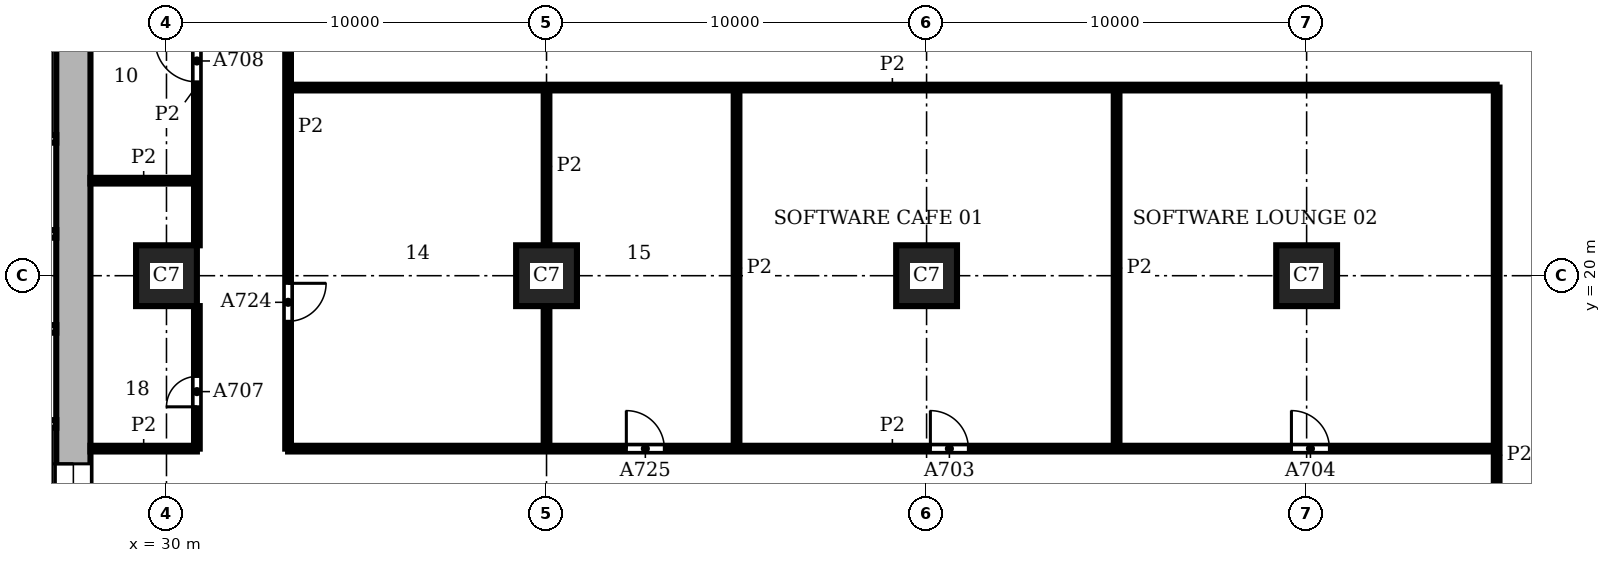
"""IFC4 building model, lengths in metres.
Left out: names, types, materials, properties, quantities, classifications, styles, units other than length and angle.
Written with IfcOpenShell. Run it as: python <this file> out.ifc"""

import sys

from ifc_helpers import new_model, si_unit, direction, frame, frame_2d, origin, origin_2d, place, context, subcontext, project, spatial, rectangle, extrude, element, fill, save


model = new_model("IFC4")
c1 = context("Model", 3, precision=1e-05, world=origin(), true_north=direction((0.0, 1.0)))
c2 = subcontext(c1, "Body", "Model", "MODEL_VIEW")
j1 = project(units=[si_unit("LENGTHUNIT", "METRE"), si_unit("PLANEANGLEUNIT", "RADIAN")], contexts=[c1])
p1 = place(None, origin())
s1 = spatial("IfcSite", under=j1, at=p1, CompositionType="ELEMENT")
p2 = place(p1, origin())
s2 = spatial("IfcBuilding", under=s1, at=p2, CompositionType="ELEMENT")
p3 = place(p2, frame((0.0, 0.0, 86.1)))
s3 = spatial("IfcBuildingStorey", under=s2, at=p3, CompositionType="ELEMENT", Elevation=86.1)
for number, where, z_axis, x_axis in (
    (1, (30.0, 20.0, 0.0), (0.0, 0.0, 1.0), (1.0, 0.0, 0.0)),
    (2, (40.0, 20.0, 0.0), (0.0, 0.0, 1.0), (1.0, 0.0, 0.0)),
    (3, (50.0, 20.0, 0.0), (0.0, 0.0, 1.0), (1.0, 0.0, 0.0)),
    (4, (60.0, 20.0, 0.0), (0.0, 0.0, 1.0), (1.0, 0.0, 0.0)),
):
    element("IfcColumn", number, at=place(p3, frame(where, z_axis=z_axis, x_axis=x_axis)), inside=s3, PredefinedType="COLUMN", context=c2, shape_type="SweptSolid", body=[
        extrude(rectangle(XDim=1.6, YDim=1.6, at=origin_2d()), origin(), (0.0, 0.0, 1.0), 3.9),
    ])
p4 = place(p3, frame((27.55, 8.9, 0.0), z_axis=(0.0, 0.0, 1.0), x_axis=(0.0, 1.0, 0.0)))
e5 = element("IfcWall", 5, at=p4, inside=s3, PredefinedType="SHEAR", context=c2, shape_type="SweptSolid", body=[
    extrude(rectangle(XDim=18.2, YDim=0.9, at=frame_2d((9.1, 0.0))), origin(), (0.0, 0.0, 1.0), 3.9),
])
p5 = place(p4, frame((4.55, 0.0, 0.0)))
e6 = element("IfcOpeningElement", 6, at=p5, cuts=e5, PredefinedType="OPENING", context=c2, shape_type="SweptSolid", body=[
    extrude(rectangle(XDim=1.6, YDim=2.1, at=frame_2d((0.8, 1.05))), frame((0.0, 0.46, 0.0), z_axis=(0.0, -1.0, 0.0), x_axis=(1.0, 0.0, 0.0)), (0.0, 0.0, 1.0), 0.92),
])
for number, where, z_axis, x_axis in (
    (7, (24.3, 16.1, 0.0), (0.0, 0.0, 1.0), (1.0, 0.0, 0.0)),
    (8, (24.3, 18.6, 0.0), (0.0, 0.0, 1.0), (1.0, 0.0, 0.0)),
    (9, (24.3, 21.1, 0.0), (0.0, 0.0, 1.0), (1.0, 0.0, 0.0)),
):
    element("IfcWall", number, at=place(p3, frame(where, z_axis=z_axis, x_axis=x_axis)), inside=s3, PredefinedType="SHEAR", context=c2, shape_type="SweptSolid", body=[
        extrude(rectangle(XDim=2.8, YDim=0.2, at=frame_2d((1.4, 0.0))), origin(), (0.0, 0.0, 1.0), 3.58),
    ])
p6 = place(p3, frame((13.8, 23.6, 0.0), z_axis=(0.0, 0.0, 1.0), x_axis=(1.0, 0.0, 0.0)))
e10 = element("IfcWall", 10, at=p6, inside=s3, PredefinedType="SHEAR", context=c2, shape_type="SweptSolid", body=[
    extrude(rectangle(XDim=13.3, YDim=0.2, at=frame_2d((6.65, 0.0))), origin(), (0.0, 0.0, 1.0), 3.58),
])
p7 = place(p6, frame((2.4, 0.0, 0.0)))
e11 = element("IfcOpeningElement", 11, at=p7, cuts=e10, PredefinedType="OPENING", context=c2, shape_type="SweptSolid", body=[
    extrude(rectangle(XDim=1.1, YDim=2.1, at=frame_2d((0.55, 1.05))), frame((0.0, 0.11, 0.0), z_axis=(0.0, -1.0, 0.0), x_axis=(1.0, 0.0, 0.0)), (0.0, 0.0, 1.0), 0.22),
])
p8 = place(p6, frame((4.9, 0.0, 0.0)))
e12 = element("IfcOpeningElement", 12, at=p8, cuts=e10, PredefinedType="OPENING", context=c2, shape_type="SweptSolid", body=[
    extrude(rectangle(XDim=1.1, YDim=2.1, at=frame_2d((0.55, 1.05))), frame((0.0, 0.11, 0.0), z_axis=(0.0, -1.0, 0.0), x_axis=(1.0, 0.0, 0.0)), (0.0, 0.0, 1.0), 0.22),
])
p9 = place(p6, frame((0.25, 0.0, 0.0)))
e13 = element("IfcOpeningElement", 13, at=p9, cuts=e10, PredefinedType="OPENING", context=c2, shape_type="SweptSolid", body=[
    extrude(rectangle(XDim=1.0, YDim=2.1, at=frame_2d((0.5, 1.05))), frame((0.0, 0.11, 0.0), z_axis=(0.0, -1.0, 0.0), x_axis=(1.0, 0.0, 0.0)), (0.0, 0.0, 1.0), 0.22),
])
p10 = place(p3, frame((30.8, 15.45, 0.0), z_axis=(0.0, 0.0, 1.0), x_axis=(0.0, 1.0, 0.0)))
e14 = element("IfcWall", 14, at=p10, inside=s3, PredefinedType="PARTITIONING", context=c2, shape_type="SweptSolid", body=[
    extrude(rectangle(XDim=3.75, YDim=0.15, at=frame_2d((1.875, 0.0))), origin(), (0.0, 0.0, 1.0), 3.58),
])
p11 = place(p10, frame((1.1, 0.0, 0.0)))
e15 = element("IfcOpeningElement", 15, at=p11, cuts=e14, PredefinedType="OPENING", context=c2, shape_type="SweptSolid", body=[
    extrude(rectangle(XDim=0.8, YDim=2.1, at=frame_2d((0.4, 1.05))), frame((0.0, 0.085, 0.0), z_axis=(0.0, -1.0, 0.0), x_axis=(1.0, 0.0, 0.0)), (0.0, 0.0, 1.0), 0.17),
])
p12 = place(p3, frame((30.8, 20.8, 0.0), z_axis=(0.0, 0.0, 1.0), x_axis=(0.0, 1.0, 0.0)))
e16 = element("IfcWall", 16, at=p12, inside=s3, PredefinedType="PARTITIONING", context=c2, shape_type="SweptSolid", body=[
    extrude(rectangle(XDim=8.4, YDim=0.15, at=frame_2d((4.2, 0.0))), origin(), (0.0, 0.0, 1.0), 3.58),
])
p13 = place(p12, frame((4.3, 0.0, 0.0)))
e17 = element("IfcOpeningElement", 17, at=p13, cuts=e16, PredefinedType="OPENING", context=c2, shape_type="SweptSolid", body=[
    extrude(rectangle(XDim=1.1, YDim=2.1, at=frame_2d((0.55, 1.05))), frame((0.0, 0.085, 0.0), z_axis=(0.0, -1.0, 0.0), x_axis=(1.0, 0.0, 0.0)), (0.0, 0.0, 1.0), 0.17),
])
p14 = place(p3, frame((33.2, 15.45, 0.0), z_axis=(0.0, 0.0, 1.0), x_axis=(0.0, 1.0, 0.0)))
e18 = element("IfcWall", 18, at=p14, inside=s3, PredefinedType="PARTITIONING", context=c2, shape_type="SweptSolid", body=[
    extrude(rectangle(XDim=16.912, YDim=0.15, at=frame_2d((8.456, 0.0))), origin(), (0.0, 0.0, 1.0), 3.58),
])
p15 = place(p14, frame((11.35, 0.0, 0.0)))
e19 = element("IfcOpeningElement", 19, at=p15, cuts=e18, PredefinedType="OPENING", context=c2, shape_type="SweptSolid", body=[
    extrude(rectangle(XDim=1.8, YDim=2.1, at=frame_2d((0.9, 1.05))), frame((0.0, 0.085, 0.0), z_axis=(0.0, -1.0, 0.0), x_axis=(1.0, 0.0, 0.0)), (0.0, 0.0, 1.0), 0.17),
])
p16 = place(p14, frame((3.35, 0.0, 0.0)))
e20 = element("IfcOpeningElement", 20, at=p16, cuts=e18, PredefinedType="OPENING", context=c2, shape_type="SweptSolid", body=[
    extrude(rectangle(XDim=1.0, YDim=2.1, at=frame_2d((0.5, 1.05))), frame((0.0, 0.085, 0.0), z_axis=(0.0, -1.0, 0.0), x_axis=(1.0, 0.0, 0.0)), (0.0, 0.0, 1.0), 0.17),
])
p17 = place(p3, frame((40.0, 15.45, 0.0), z_axis=(0.0, 0.0, 1.0), x_axis=(0.0, 1.0, 0.0)))
e21 = element("IfcWall", 21, at=p17, inside=s3, PredefinedType="PARTITIONING", context=c2, shape_type="SweptSolid", body=[
    extrude(rectangle(XDim=3.75, YDim=0.15, at=frame_2d((1.875, 0.0))), origin(), (0.0, 0.0, 1.0), 3.58),
])
p18 = place(p3, frame((40.0, 20.8, 0.0), z_axis=(0.0, 0.0, 1.0), x_axis=(0.0, 1.0, 0.0)))
e22 = element("IfcWall", 22, at=p18, inside=s3, PredefinedType="PARTITIONING", context=c2, shape_type="SweptSolid", body=[
    extrude(rectangle(XDim=4.15, YDim=0.15, at=frame_2d((2.075, 0.0))), origin(), (0.0, 0.0, 1.0), 3.58),
])
for number, where, z_axis, x_axis in (
    (23, (45.0, 15.45, 0.0), (0.0, 0.0, 1.0), (0.0, 1.0, 0.0)),
    (24, (55.0, 15.45, 0.0), (0.0, 0.0, 1.0), (0.0, 1.0, 0.0)),
):
    element("IfcWall", number, at=place(p3, frame(where, z_axis=z_axis, x_axis=x_axis)), inside=s3, PredefinedType="PARTITIONING", context=c2, shape_type="SweptSolid", body=[
        extrude(rectangle(XDim=9.5, YDim=0.15, at=frame_2d((4.75, 0.0))), origin(), (0.0, 0.0, 1.0), 3.58),
    ])
p19 = place(p3, frame((65.0, 5.6, 0.0), z_axis=(0.0, 0.0, 1.0), x_axis=(0.0, 1.0, 0.0)))
e25 = element("IfcWall", 25, at=p19, inside=s3, PredefinedType="PARTITIONING", context=c2, shape_type="SweptSolid", body=[
    extrude(rectangle(XDim=19.35, YDim=0.15, at=frame_2d((9.675, 0.0))), origin(), (0.0, 0.0, 1.0), 3.58),
])
p20 = place(p3, frame((28.0, 15.45, 0.0), z_axis=(0.0, 0.0, 1.0), x_axis=(1.0, 0.0, 0.0)))
e26 = element("IfcWall", 26, at=p20, inside=s3, PredefinedType="PARTITIONING", context=c2, shape_type="SweptSolid", body=[
    extrude(rectangle(XDim=2.8, YDim=0.15, at=frame_2d((1.4, 0.0))), origin(), (0.0, 0.0, 1.0), 3.58),
])
p21 = place(p3, frame((33.2, 15.45, 0.0), z_axis=(0.0, 0.0, 1.0), x_axis=(1.0, 0.0, 0.0)))
e27 = element("IfcWall", 27, at=p21, inside=s3, PredefinedType="PARTITIONING", context=c2, shape_type="SweptSolid", body=[
    extrude(rectangle(XDim=31.8, YDim=0.15, at=frame_2d((15.9, 0.0))), origin(), (0.0, 0.0, 1.0), 3.58),
])
p22 = place(p21, frame((16.9, 0.0, 0.0)))
e28 = element("IfcOpeningElement", 28, at=p22, cuts=e27, PredefinedType="OPENING", context=c2, shape_type="SweptSolid", body=[
    extrude(rectangle(XDim=1.0, YDim=2.1, at=frame_2d((0.5, 1.05))), frame((0.0, 0.085, 0.0), z_axis=(0.0, -1.0, 0.0), x_axis=(1.0, 0.0, 0.0)), (0.0, 0.0, 1.0), 0.17),
])
p23 = place(p21, frame((26.4, 0.0, 0.0)))
e29 = element("IfcOpeningElement", 29, at=p23, cuts=e27, PredefinedType="OPENING", context=c2, shape_type="SweptSolid", body=[
    extrude(rectangle(XDim=1.0, YDim=2.1, at=frame_2d((0.5, 1.05))), frame((0.0, 0.085, 0.0), z_axis=(0.0, -1.0, 0.0), x_axis=(1.0, 0.0, 0.0)), (0.0, 0.0, 1.0), 0.17),
])
p24 = place(p21, frame((8.9, 0.0, 0.0)))
e30 = element("IfcOpeningElement", 30, at=p24, cuts=e27, PredefinedType="OPENING", context=c2, shape_type="SweptSolid", body=[
    extrude(rectangle(XDim=1.0, YDim=2.1, at=frame_2d((0.5, 1.05))), frame((0.0, 0.085, 0.0), z_axis=(0.0, -1.0, 0.0), x_axis=(1.0, 0.0, 0.0)), (0.0, 0.0, 1.0), 0.17),
])
p25 = place(p3, frame((28.0, 22.5, 0.0), z_axis=(0.0, 0.0, 1.0), x_axis=(1.0, 0.0, 0.0)))
e31 = element("IfcWall", 31, at=p25, inside=s3, PredefinedType="PARTITIONING", context=c2, shape_type="SweptSolid", body=[
    extrude(rectangle(XDim=2.8, YDim=0.15, at=frame_2d((1.4, 0.0))), origin(), (0.0, 0.0, 1.0), 3.58),
])
p26 = place(p3, frame((33.2, 24.95, 0.0), z_axis=(0.0, 0.0, 1.0), x_axis=(1.0, 0.0, 0.0)))
e32 = element("IfcWall", 32, at=p26, inside=s3, PredefinedType="PARTITIONING", context=c2, shape_type="SweptSolid", body=[
    extrude(rectangle(XDim=31.8, YDim=0.15, at=frame_2d((15.9, 0.0))), origin(), (0.0, 0.0, 1.0), 3.58),
])
p27 = place(p5, origin())
e33 = element("IfcDoor", 33, at=p27, inside=s3, OperationType="DOUBLE_DOOR_SINGLE_SWING", PredefinedType="DOOR", context=c2, shape_type="SweptSolid", body=[
    extrude(rectangle(XDim=1.6, YDim=2.1, at=frame_2d((0.8, 1.05))), frame((0.0, 0.025, 0.0), z_axis=(0.0, -1.0, 0.0), x_axis=(1.0, 0.0, 0.0)), (0.0, 0.0, 1.0), 0.05),
])
fill(e6, e33)
p28 = place(p22, origin())
e34 = element("IfcDoor", 34, at=p28, inside=s3, OperationType="SINGLE_SWING_LEFT", PredefinedType="DOOR", context=c2, shape_type="SweptSolid", body=[
    extrude(rectangle(XDim=1.0, YDim=2.1, at=frame_2d((0.5, 1.05))), frame((0.0, 0.025, 0.0), z_axis=(0.0, -1.0, 0.0), x_axis=(1.0, 0.0, 0.0)), (0.0, 0.0, 1.0), 0.05),
])
fill(e28, e34)
p29 = place(p23, origin())
e35 = element("IfcDoor", 35, at=p29, inside=s3, OperationType="SINGLE_SWING_LEFT", PredefinedType="DOOR", context=c2, shape_type="SweptSolid", body=[
    extrude(rectangle(XDim=1.0, YDim=2.1, at=frame_2d((0.5, 1.05))), frame((0.0, 0.025, 0.0), z_axis=(0.0, -1.0, 0.0), x_axis=(1.0, 0.0, 0.0)), (0.0, 0.0, 1.0), 0.05),
])
fill(e29, e35)
p30 = place(p11, origin())
e36 = element("IfcDoor", 36, at=p30, inside=s3, OperationType="SINGLE_SWING_LEFT", PredefinedType="DOOR", context=c2, shape_type="SweptSolid", body=[
    extrude(rectangle(XDim=0.8, YDim=2.1, at=frame_2d((0.4, 1.05))), frame((0.0, 0.025, 0.0), z_axis=(0.0, -1.0, 0.0), x_axis=(1.0, 0.0, 0.0)), (0.0, 0.0, 1.0), 0.05),
])
fill(e15, e36)
p31 = place(p13, origin())
e37 = element("IfcDoor", 37, at=p31, inside=s3, OperationType="SINGLE_SWING_RIGHT", PredefinedType="DOOR", context=c2, shape_type="SweptSolid", body=[
    extrude(rectangle(XDim=1.1, YDim=2.1, at=frame_2d((0.55, 1.05))), frame((0.0, 0.025, 0.0), z_axis=(0.0, -1.0, 0.0), x_axis=(1.0, 0.0, 0.0)), (0.0, 0.0, 1.0), 0.05),
])
fill(e17, e37)
p32 = place(p16, frame((1.0, 0.0, 0.0), z_axis=(0.0, 0.0, 1.0), x_axis=(-1.0, 0.0, 0.0)))
e38 = element("IfcDoor", 38, at=p32, inside=s3, OperationType="SINGLE_SWING_LEFT", PredefinedType="DOOR", context=c2, shape_type="SweptSolid", body=[
    extrude(rectangle(XDim=1.0, YDim=2.1, at=frame_2d((0.5, 1.05))), frame((0.0, 0.025, 0.0), z_axis=(0.0, -1.0, 0.0), x_axis=(1.0, 0.0, 0.0)), (0.0, 0.0, 1.0), 0.05),
])
fill(e20, e38)
p33 = place(p24, origin())
e39 = element("IfcDoor", 39, at=p33, inside=s3, OperationType="SINGLE_SWING_LEFT", PredefinedType="DOOR", context=c2, shape_type="SweptSolid", body=[
    extrude(rectangle(XDim=1.0, YDim=2.1, at=frame_2d((0.5, 1.05))), frame((0.0, 0.025, 0.0), z_axis=(0.0, -1.0, 0.0), x_axis=(1.0, 0.0, 0.0)), (0.0, 0.0, 1.0), 0.05),
])
fill(e30, e39)
save(model, sys.argv[1])
